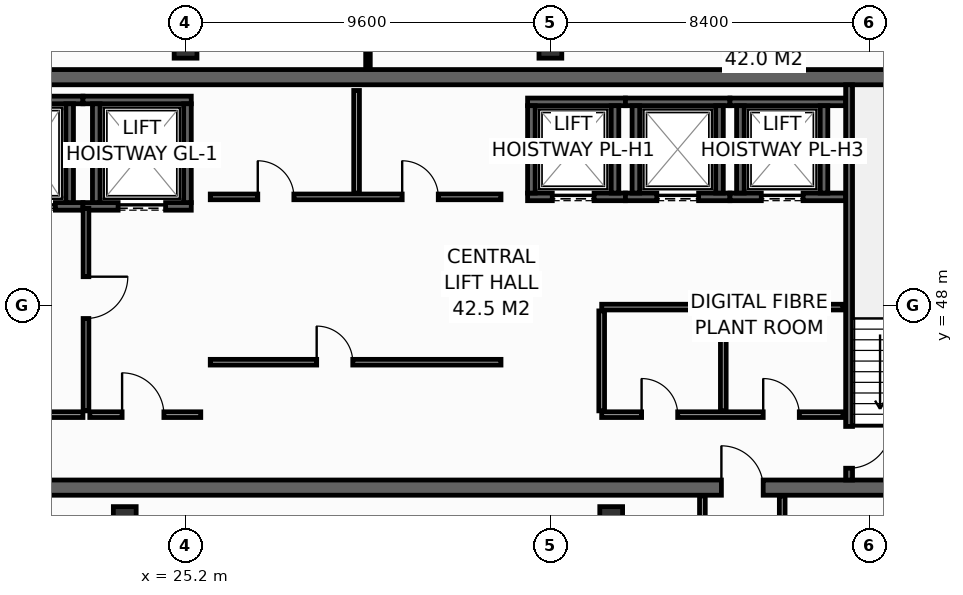
"""IFC4 building model, lengths in metres.
Left out: names, types, materials, properties, quantities, classifications, styles, units other than length and angle.
Written with IfcOpenShell. Run it as: python <this file> out.ifc"""

import sys

from ifc_helpers import new_model, si_unit, direction, frame, frame_2d, origin, origin_2d, place, context, subcontext, project, spatial, rectangle, hollow_rectangle, extrude, element, fill, save


model = new_model("IFC4")
c1 = context("Model", 3, precision=1e-05, world=origin(), true_north=direction((0.0, 1.0)))
c2 = subcontext(c1, "Body", "Model", "MODEL_VIEW")
j1 = project(units=[si_unit("LENGTHUNIT", "METRE"), si_unit("PLANEANGLEUNIT", "RADIAN")], contexts=[c1])
p1 = place(None, origin())
s1 = spatial("IfcSite", under=j1, at=p1, CompositionType="ELEMENT")
p2 = place(p1, origin())
s2 = spatial("IfcBuilding", under=s1, at=p2, CompositionType="ELEMENT")
p3 = place(p2, frame((0.0, 0.0, 287.6)))
s3 = spatial("IfcBuildingStorey", under=s2, at=p3, CompositionType="ELEMENT", Elevation=287.6)
p4 = place(p3, frame((13.7, 43.2, 0.0), z_axis=(0.0, 0.0, 1.0), x_axis=(1.0, 0.0, 0.0)))
e1 = element("IfcWall", 1, at=p4, inside=s3, PredefinedType="SHEAR", context=c2, shape_type="SweptSolid", body=[
    extrude(rectangle(XDim=32.5, YDim=0.4, at=frame_2d((16.25, 0.0))), origin(), (0.0, 0.0, 1.0), 3.55),
])
p5 = place(p4, frame((5.4, 0.0, 0.0)))
e2 = element("IfcOpeningElement", 2, at=p5, cuts=e1, PredefinedType="OPENING", context=c2, shape_type="SweptSolid", body=[
    extrude(rectangle(XDim=1.1, YDim=2.15, at=frame_2d((0.55, 1.075))), frame((0.0, 0.21, 0.0), z_axis=(0.0, -1.0, 0.0), x_axis=(1.0, 0.0, 0.0)), (0.0, 0.0, 1.0), 0.42),
])
p6 = place(p4, frame((25.6, 0.0, 0.0)))
e3 = element("IfcOpeningElement", 3, at=p6, cuts=e1, PredefinedType="OPENING", context=c2, shape_type="SweptSolid", body=[
    extrude(rectangle(XDim=1.1, YDim=2.15, at=frame_2d((0.55, 1.075))), frame((0.0, 0.21, 0.0), z_axis=(0.0, -1.0, 0.0), x_axis=(1.0, 0.0, 0.0)), (0.0, 0.0, 1.0), 0.42),
])
p7 = place(p3, frame((13.7, 54.0, 0.0), z_axis=(0.0, 0.0, 1.0), x_axis=(1.0, 0.0, 0.0)))
e4 = element("IfcWall", 4, at=p7, inside=s3, PredefinedType="SHEAR", context=c2, shape_type="SweptSolid", body=[
    extrude(rectangle(XDim=32.5, YDim=0.4, at=frame_2d((16.25, 0.0))), origin(), (0.0, 0.0, 1.0), 3.55),
])
for number, where, z_axis, x_axis in (
    (5, (25.2, 54.8, 0.0), (0.0, 0.0, 1.0), (1.0, 0.0, 0.0)),
    (6, (34.8, 54.8, 0.0), (0.0, 0.0, 1.0), (1.0, 0.0, 0.0)),
    (7, (23.6, 42.4, 0.0), (0.0, 0.0, 1.0), (1.0, 0.0, 0.0)),
    (8, (36.4, 42.4, 0.0), (0.0, 0.0, 1.0), (1.0, 0.0, 0.0)),
):
    element("IfcColumn", number, at=place(p3, frame(where, z_axis=z_axis, x_axis=x_axis)), inside=s3, PredefinedType="COLUMN", context=c2, shape_type="SweptSolid", body=[
        extrude(hollow_rectangle(XDim=0.6, YDim=0.6, WallThickness=0.028, at=origin_2d()), origin(), (0.0, 0.0, 1.0), 3.8),
    ])
p8 = place(p3, frame((19.85, 50.6, 0.0), z_axis=(0.0, 0.0, 1.0), x_axis=(1.0, 0.0, 0.0)))
e9 = element("IfcWall", 9, at=p8, inside=s3, PredefinedType="SHEAR", context=c2, shape_type="SweptSolid", body=[
    extrude(rectangle(XDim=2.65, YDim=0.2, at=frame_2d((1.325, 0.0))), origin(), (0.0, 0.0, 1.0), 3.55),
])
p9 = place(p8, frame((0.675, 0.0, 0.0)))
e10 = element("IfcOpeningElement", 10, at=p9, cuts=e9, PredefinedType="OPENING", context=c2, shape_type="SweptSolid", body=[
    extrude(rectangle(XDim=1.25, YDim=2.3, at=frame_2d((0.625, 1.15))), frame((0.0, 0.11, 0.0), z_axis=(0.0, -1.0, 0.0), x_axis=(1.0, 0.0, 0.0)), (0.0, 0.0, 1.0), 0.22),
])
p10 = place(p3, frame((19.85, 53.4, 0.0), z_axis=(0.0, 0.0, 1.0), x_axis=(1.0, 0.0, 0.0)))
e11 = element("IfcWall", 11, at=p10, inside=s3, PredefinedType="SHEAR", context=c2, shape_type="SweptSolid", body=[
    extrude(rectangle(XDim=2.65, YDim=0.2, at=frame_2d((1.325, 0.0))), origin(), (0.0, 0.0, 1.0), 3.55),
])
p11 = place(p3, frame((22.15, 50.7, 0.0), z_axis=(0.0, 0.0, 1.0), x_axis=(0.0, 1.0, 0.0)))
e12 = element("IfcWall", 12, at=p11, inside=s3, PredefinedType="SHEAR", context=c2, shape_type="SweptSolid", body=[
    extrude(rectangle(XDim=2.6, YDim=0.2, at=frame_2d((1.3, 0.0))), origin(), (0.0, 0.0, 1.0), 3.55),
])
p12 = place(p3, frame((22.5, 50.6, 0.0), z_axis=(0.0, 0.0, 1.0), x_axis=(1.0, 0.0, 0.0)))
e13 = element("IfcWall", 13, at=p12, inside=s3, PredefinedType="SHEAR", context=c2, shape_type="SweptSolid", body=[
    extrude(rectangle(XDim=2.85, YDim=0.2, at=frame_2d((1.425, 0.0))), origin(), (0.0, 0.0, 1.0), 3.55),
])
p13 = place(p12, frame((0.925, 0.0, 0.0)))
e14 = element("IfcOpeningElement", 14, at=p13, cuts=e13, PredefinedType="OPENING", context=c2, shape_type="SweptSolid", body=[
    extrude(rectangle(XDim=1.25, YDim=2.3, at=frame_2d((0.625, 1.15))), frame((0.0, 0.11, 0.0), z_axis=(0.0, -1.0, 0.0), x_axis=(1.0, 0.0, 0.0)), (0.0, 0.0, 1.0), 0.22),
])
p14 = place(p3, frame((22.5, 53.4, 0.0), z_axis=(0.0, 0.0, 1.0), x_axis=(1.0, 0.0, 0.0)))
e15 = element("IfcWall", 15, at=p14, inside=s3, PredefinedType="SHEAR", context=c2, shape_type="SweptSolid", body=[
    extrude(rectangle(XDim=2.85, YDim=0.2, at=frame_2d((1.425, 0.0))), origin(), (0.0, 0.0, 1.0), 3.55),
])
for number, where, z_axis, x_axis in (
    (16, (22.85, 50.7, 0.0), (0.0, 0.0, 1.0), (0.0, 1.0, 0.0)),
    (17, (25.25, 50.7, 0.0), (0.0, 0.0, 1.0), (0.0, 1.0, 0.0)),
):
    element("IfcWall", number, at=place(p3, frame(where, z_axis=z_axis, x_axis=x_axis)), inside=s3, PredefinedType="SHEAR", context=c2, shape_type="SweptSolid", body=[
        extrude(rectangle(XDim=2.6, YDim=0.2, at=frame_2d((1.3, 0.0))), origin(), (0.0, 0.0, 1.0), 3.55),
    ])
p15 = place(p3, frame((34.2, 50.85, 0.0), z_axis=(0.0, 0.0, 1.0), x_axis=(1.0, 0.0, 0.0)))
e18 = element("IfcWall", 18, at=p15, inside=s3, PredefinedType="SHEAR", context=c2, shape_type="SweptSolid", body=[
    extrude(rectangle(XDim=2.575, YDim=0.2, at=frame_2d((1.288, 0.0))), origin(), (0.0, 0.0, 1.0), 3.55),
])
p16 = place(p15, frame((0.65, 0.0, 0.0)))
e19 = element("IfcOpeningElement", 19, at=p16, cuts=e18, PredefinedType="OPENING", context=c2, shape_type="SweptSolid", body=[
    extrude(rectangle(XDim=1.1, YDim=2.2, at=frame_2d((0.55, 1.1))), frame((0.0, 0.11, 0.0), z_axis=(0.0, -1.0, 0.0), x_axis=(1.0, 0.0, 0.0)), (0.0, 0.0, 1.0), 0.22),
])
p17 = place(p3, frame((34.2, 53.35, 0.0), z_axis=(0.0, 0.0, 1.0), x_axis=(1.0, 0.0, 0.0)))
e20 = element("IfcWall", 20, at=p17, inside=s3, PredefinedType="SHEAR", context=c2, shape_type="SweptSolid", body=[
    extrude(rectangle(XDim=2.575, YDim=0.2, at=frame_2d((1.288, 0.0))), origin(), (0.0, 0.0, 1.0), 3.55),
])
for number, where, z_axis, x_axis in (
    (21, (34.3, 50.95, 0.0), (0.0, 0.0, 1.0), (0.0, 1.0, 0.0)),
    (22, (36.5, 50.95, 0.0), (0.0, 0.0, 1.0), (0.0, 1.0, 0.0)),
):
    element("IfcWall", number, at=place(p3, frame(where, z_axis=z_axis, x_axis=x_axis)), inside=s3, PredefinedType="SHEAR", context=c2, shape_type="SweptSolid", body=[
        extrude(rectangle(XDim=2.3, YDim=0.2, at=frame_2d((1.15, 0.0))), origin(), (0.0, 0.0, 1.0), 3.55),
    ])
p18 = place(p3, frame((36.775, 50.85, 0.0), z_axis=(0.0, 0.0, 1.0), x_axis=(1.0, 0.0, 0.0)))
e23 = element("IfcWall", 23, at=p18, inside=s3, PredefinedType="SHEAR", context=c2, shape_type="SweptSolid", body=[
    extrude(rectangle(XDim=2.75, YDim=0.2, at=frame_2d((1.375, 0.0))), origin(), (0.0, 0.0, 1.0), 3.55),
])
p19 = place(p18, frame((0.825, 0.0, 0.0)))
e24 = element("IfcOpeningElement", 24, at=p19, cuts=e23, PredefinedType="OPENING", context=c2, shape_type="SweptSolid", body=[
    extrude(rectangle(XDim=1.1, YDim=2.2, at=frame_2d((0.55, 1.1))), frame((0.0, 0.11, 0.0), z_axis=(0.0, -1.0, 0.0), x_axis=(1.0, 0.0, 0.0)), (0.0, 0.0, 1.0), 0.22),
])
p20 = place(p3, frame((36.775, 53.35, 0.0), z_axis=(0.0, 0.0, 1.0), x_axis=(1.0, 0.0, 0.0)))
e25 = element("IfcWall", 25, at=p20, inside=s3, PredefinedType="SHEAR", context=c2, shape_type="SweptSolid", body=[
    extrude(rectangle(XDim=2.75, YDim=0.2, at=frame_2d((1.375, 0.0))), origin(), (0.0, 0.0, 1.0), 3.55),
])
for number, where, z_axis, x_axis in (
    (26, (37.05, 50.95, 0.0), (0.0, 0.0, 1.0), (0.0, 1.0, 0.0)),
    (27, (39.25, 50.95, 0.0), (0.0, 0.0, 1.0), (0.0, 1.0, 0.0)),
):
    element("IfcWall", number, at=place(p3, frame(where, z_axis=z_axis, x_axis=x_axis)), inside=s3, PredefinedType="SHEAR", context=c2, shape_type="SweptSolid", body=[
        extrude(rectangle(XDim=2.3, YDim=0.2, at=frame_2d((1.15, 0.0))), origin(), (0.0, 0.0, 1.0), 3.55),
    ])
p21 = place(p3, frame((39.525, 50.85, 0.0), z_axis=(0.0, 0.0, 1.0), x_axis=(1.0, 0.0, 0.0)))
e28 = element("IfcWall", 28, at=p21, inside=s3, PredefinedType="SHEAR", context=c2, shape_type="SweptSolid", body=[
    extrude(rectangle(XDim=3.045, YDim=0.2, at=frame_2d((1.522, 0.0))), origin(), (0.0, 0.0, 1.0), 3.55),
])
p22 = place(p21, frame((0.825, 0.0, 0.0)))
e29 = element("IfcOpeningElement", 29, at=p22, cuts=e28, PredefinedType="OPENING", context=c2, shape_type="SweptSolid", body=[
    extrude(rectangle(XDim=1.1, YDim=2.2, at=frame_2d((0.55, 1.1))), frame((0.0, 0.11, 0.0), z_axis=(0.0, -1.0, 0.0), x_axis=(1.0, 0.0, 0.0)), (0.0, 0.0, 1.0), 0.22),
])
p23 = place(p3, frame((39.525, 53.35, 0.0), z_axis=(0.0, 0.0, 1.0), x_axis=(1.0, 0.0, 0.0)))
e30 = element("IfcWall", 30, at=p23, inside=s3, PredefinedType="SHEAR", context=c2, shape_type="SweptSolid", body=[
    extrude(rectangle(XDim=3.045, YDim=0.2, at=frame_2d((1.522, 0.0))), origin(), (0.0, 0.0, 1.0), 3.55),
])
for number, where, z_axis, x_axis in (
    (31, (39.8, 50.95, 0.0), (0.0, 0.0, 1.0), (0.0, 1.0, 0.0)),
    (32, (42.0, 50.95, 0.0), (0.0, 0.0, 1.0), (0.0, 1.0, 0.0)),
):
    element("IfcWall", number, at=place(p3, frame(where, z_axis=z_axis, x_axis=x_axis)), inside=s3, PredefinedType="SHEAR", context=c2, shape_type="SweptSolid", body=[
        extrude(rectangle(XDim=2.3, YDim=0.2, at=frame_2d((1.15, 0.0))), origin(), (0.0, 0.0, 1.0), 3.55),
    ])
p24 = place(p3, frame((42.66, 53.8, 0.0), z_axis=(0.0, 0.0, 1.0), x_axis=(0.0, -1.0, 0.0)))
e33 = element("IfcWall", 33, at=p24, inside=s3, PredefinedType="SHEAR", context=c2, shape_type="SweptSolid", body=[
    extrude(rectangle(XDim=10.4, YDim=0.18, at=frame_2d((5.2, 0.0))), origin(), (0.0, 0.0, 1.0), 3.55),
])
p25 = place(p24, frame((8.99, 0.0, 0.0)))
e34 = element("IfcOpeningElement", 34, at=p25, cuts=e33, PredefinedType="OPENING", context=c2, shape_type="SweptSolid", body=[
    extrude(rectangle(XDim=1.1, YDim=2.15, at=frame_2d((0.55, 1.075))), frame((0.0, 0.1, 0.0), z_axis=(0.0, -1.0, 0.0), x_axis=(1.0, 0.0, 0.0)), (0.0, 0.0, 1.0), 0.2),
])
p26 = place(p3, frame((17.36, 45.12, 0.0), z_axis=(0.0, 0.0, 1.0), x_axis=(1.0, 0.0, 0.0)))
e35 = element("IfcWall", 35, at=p26, inside=s3, PredefinedType="PARTITIONING", context=c2, shape_type="SweptSolid", body=[
    extrude(rectangle(XDim=5.14, YDim=0.15, at=frame_2d((2.57, 0.0))), origin(), (0.0, 0.0, 1.0), 3.55),
])
p27 = place(p26, frame((1.8, 0.0, 0.0)))
e36 = element("IfcOpeningElement", 36, at=p27, cuts=e35, PredefinedType="OPENING", context=c2, shape_type="SweptSolid", body=[
    extrude(rectangle(XDim=1.1, YDim=2.15, at=frame_2d((0.55, 1.075))), frame((0.0, 0.085, 0.0), z_axis=(0.0, -1.0, 0.0), x_axis=(1.0, 0.0, 0.0)), (0.0, 0.0, 1.0), 0.17),
])
p28 = place(p3, frame((22.58, 50.55, 0.0), z_axis=(0.0, 0.0, 1.0), x_axis=(0.0, -1.0, 0.0)))
e37 = element("IfcWall", 37, at=p28, inside=s3, PredefinedType="PARTITIONING", context=c2, shape_type="SweptSolid", body=[
    extrude(rectangle(XDim=5.33, YDim=0.15, at=frame_2d((2.665, 0.0))), origin(), (0.0, 0.0, 1.0), 3.55),
])
p29 = place(p28, frame((1.8, 0.0, 0.0)))
e38 = element("IfcOpeningElement", 38, at=p29, cuts=e37, PredefinedType="OPENING", context=c2, shape_type="SweptSolid", body=[
    extrude(rectangle(XDim=1.1, YDim=2.15, at=frame_2d((0.55, 1.075))), frame((0.0, 0.085, 0.0), z_axis=(0.0, -1.0, 0.0), x_axis=(1.0, 0.0, 0.0)), (0.0, 0.0, 1.0), 0.17),
])
p30 = place(p3, frame((22.68, 45.12, 0.0), z_axis=(0.0, 0.0, 1.0), x_axis=(1.0, 0.0, 0.0)))
e39 = element("IfcWall", 39, at=p30, inside=s3, PredefinedType="PARTITIONING", context=c2, shape_type="SweptSolid", body=[
    extrude(rectangle(XDim=2.92, YDim=0.15, at=frame_2d((1.46, 0.0))), origin(), (0.0, 0.0, 1.0), 3.55),
])
p31 = place(p30, frame((0.85, 0.0, 0.0)))
e40 = element("IfcOpeningElement", 40, at=p31, cuts=e39, PredefinedType="OPENING", context=c2, shape_type="SweptSolid", body=[
    extrude(rectangle(XDim=1.1, YDim=2.15, at=frame_2d((0.55, 1.075))), frame((0.0, 0.085, 0.0), z_axis=(0.0, -1.0, 0.0), x_axis=(1.0, 0.0, 0.0)), (0.0, 0.0, 1.0), 0.17),
])
p32 = place(p3, frame((36.15, 45.12, 0.0), z_axis=(0.0, 0.0, 1.0), x_axis=(1.0, 0.0, 0.0)))
e41 = element("IfcWall", 41, at=p32, inside=s3, PredefinedType="PARTITIONING", context=c2, shape_type="SweptSolid", body=[
    extrude(rectangle(XDim=6.35, YDim=0.15, at=frame_2d((3.175, 0.0))), origin(), (0.0, 0.0, 1.0), 3.55),
])
p33 = place(p32, frame((1.05, 0.0, 0.0)))
e42 = element("IfcOpeningElement", 42, at=p33, cuts=e41, PredefinedType="OPENING", context=c2, shape_type="SweptSolid", body=[
    extrude(rectangle(XDim=0.95, YDim=2.15, at=frame_2d((0.475, 1.075))), frame((0.0, 0.085, 0.0), z_axis=(0.0, -1.0, 0.0), x_axis=(1.0, 0.0, 0.0)), (0.0, 0.0, 1.0), 0.17),
])
p34 = place(p32, frame((4.25, 0.0, 0.0)))
e43 = element("IfcOpeningElement", 43, at=p34, cuts=e41, PredefinedType="OPENING", context=c2, shape_type="SweptSolid", body=[
    extrude(rectangle(XDim=0.95, YDim=2.15, at=frame_2d((0.475, 1.075))), frame((0.0, 0.085, 0.0), z_axis=(0.0, -1.0, 0.0), x_axis=(1.0, 0.0, 0.0)), (0.0, 0.0, 1.0), 0.17),
])
p35 = place(p3, frame((36.15, 47.95, 0.0), z_axis=(0.0, 0.0, 1.0), x_axis=(1.0, 0.0, 0.0)))
e44 = element("IfcWall", 44, at=p35, inside=s3, PredefinedType="PARTITIONING", context=c2, shape_type="SweptSolid", body=[
    extrude(rectangle(XDim=6.35, YDim=0.15, at=frame_2d((3.175, 0.0))), origin(), (0.0, 0.0, 1.0), 3.55),
])
for number, where, z_axis, x_axis in (
    (45, (36.15, 45.22, 0.0), (0.0, 0.0, 1.0), (0.0, 1.0, 0.0)),
    (46, (39.35, 45.22, 0.0), (0.0, 0.0, 1.0), (0.0, 1.0, 0.0)),
):
    element("IfcWall", number, at=place(p3, frame(where, z_axis=z_axis, x_axis=x_axis)), inside=s3, PredefinedType="PARTITIONING", context=c2, shape_type="SweptSolid", body=[
        extrude(rectangle(XDim=2.63, YDim=0.15, at=frame_2d((1.315, 0.0))), origin(), (0.0, 0.0, 1.0), 3.55),
    ])
p36 = place(p3, frame((25.85, 50.85, 0.0), z_axis=(0.0, 0.0, 1.0), x_axis=(1.0, 0.0, 0.0)))
e47 = element("IfcWall", 47, at=p36, inside=s3, PredefinedType="PARTITIONING", context=c2, shape_type="SweptSolid", body=[
    extrude(rectangle(XDim=7.65, YDim=0.15, at=frame_2d((3.825, 0.0))), origin(), (0.0, 0.0, 1.0), 3.55),
])
p37 = place(p36, frame((1.25, 0.0, 0.0)))
e48 = element("IfcOpeningElement", 48, at=p37, cuts=e47, PredefinedType="OPENING", context=c2, shape_type="SweptSolid", body=[
    extrude(rectangle(XDim=0.95, YDim=2.15, at=frame_2d((0.475, 1.075))), frame((0.0, 0.085, 0.0), z_axis=(0.0, -1.0, 0.0), x_axis=(1.0, 0.0, 0.0)), (0.0, 0.0, 1.0), 0.17),
])
p38 = place(p36, frame((5.05, 0.0, 0.0)))
e49 = element("IfcOpeningElement", 49, at=p38, cuts=e47, PredefinedType="OPENING", context=c2, shape_type="SweptSolid", body=[
    extrude(rectangle(XDim=0.95, YDim=2.15, at=frame_2d((0.475, 1.075))), frame((0.0, 0.085, 0.0), z_axis=(0.0, -1.0, 0.0), x_axis=(1.0, 0.0, 0.0)), (0.0, 0.0, 1.0), 0.17),
])
p39 = place(p3, frame((29.7, 50.95, 0.0), z_axis=(0.0, 0.0, 1.0), x_axis=(0.0, 1.0, 0.0)))
e50 = element("IfcWall", 50, at=p39, inside=s3, PredefinedType="PARTITIONING", context=c2, shape_type="SweptSolid", body=[
    extrude(rectangle(XDim=2.7, YDim=0.15, at=frame_2d((1.35, 0.0))), origin(), (0.0, 0.0, 1.0), 3.55),
])
p40 = place(p3, frame((25.85, 46.5, 0.0), z_axis=(0.0, 0.0, 1.0), x_axis=(1.0, 0.0, 0.0)))
e51 = element("IfcWall", 51, at=p40, inside=s3, PredefinedType="PARTITIONING", context=c2, shape_type="SweptSolid", body=[
    extrude(rectangle(XDim=7.65, YDim=0.15, at=frame_2d((3.825, 0.0))), origin(), (0.0, 0.0, 1.0), 3.55),
])
p41 = place(p40, frame((2.8, 0.0, 0.0)))
e52 = element("IfcOpeningElement", 52, at=p41, cuts=e51, PredefinedType="OPENING", context=c2, shape_type="SweptSolid", body=[
    extrude(rectangle(XDim=0.95, YDim=2.15, at=frame_2d((0.475, 1.075))), frame((0.0, 0.085, 0.0), z_axis=(0.0, -1.0, 0.0), x_axis=(1.0, 0.0, 0.0)), (0.0, 0.0, 1.0), 0.17),
])
p42 = place(p3, frame((30.0, 54.22, 0.0), z_axis=(0.0, 0.0, 1.0), x_axis=(0.0, 1.0, 0.0)))
e53 = element("IfcWall", 53, at=p42, inside=s3, PredefinedType="PARTITIONING", context=c2, shape_type="SweptSolid", body=[
    extrude(rectangle(XDim=1.775, YDim=0.12, at=frame_2d((0.888, 0.0))), origin(), (0.0, 0.0, 1.0), 2.935),
])
for number, where, z_axis, x_axis in (
    (54, (38.8, 41.15, 0.0), (0.0, 0.0, 1.0), (0.0, 1.0, 0.0)),
    (55, (40.9, 41.15, 0.0), (0.0, 0.0, 1.0), (0.0, 1.0, 0.0)),
):
    element("IfcWall", number, at=place(p3, frame(where, z_axis=z_axis, x_axis=x_axis)), inside=s3, PredefinedType="PARTITIONING", context=c2, shape_type="SweptSolid", body=[
        extrude(rectangle(XDim=1.83, YDim=0.15, at=frame_2d((0.915, 0.0))), origin(), (0.0, 0.0, 1.0), 3.55),
    ])
p43 = place(p9, origin())
e56 = element("IfcDoor", 56, at=p43, inside=s3, OperationType="SLIDING_TO_LEFT", PredefinedType="DOOR", context=c2, shape_type="SweptSolid", body=[
    extrude(rectangle(XDim=1.25, YDim=2.3, at=frame_2d((0.625, 1.15))), frame((0.0, 0.025, 0.0), z_axis=(0.0, -1.0, 0.0), x_axis=(1.0, 0.0, 0.0)), (0.0, 0.0, 1.0), 0.05),
])
fill(e10, e56)
p44 = place(p13, origin())
e57 = element("IfcDoor", 57, at=p44, inside=s3, OperationType="SLIDING_TO_LEFT", PredefinedType="DOOR", context=c2, shape_type="SweptSolid", body=[
    extrude(rectangle(XDim=1.25, YDim=2.3, at=frame_2d((0.625, 1.15))), frame((0.0, 0.025, 0.0), z_axis=(0.0, -1.0, 0.0), x_axis=(1.0, 0.0, 0.0)), (0.0, 0.0, 1.0), 0.05),
])
fill(e14, e57)
p45 = place(p16, origin())
e58 = element("IfcDoor", 58, at=p45, inside=s3, OperationType="SLIDING_TO_LEFT", PredefinedType="DOOR", context=c2, shape_type="SweptSolid", body=[
    extrude(rectangle(XDim=1.1, YDim=2.2, at=frame_2d((0.55, 1.1))), frame((0.0, 0.025, 0.0), z_axis=(0.0, -1.0, 0.0), x_axis=(1.0, 0.0, 0.0)), (0.0, 0.0, 1.0), 0.05),
])
fill(e19, e58)
p46 = place(p19, origin())
e59 = element("IfcDoor", 59, at=p46, inside=s3, OperationType="SLIDING_TO_LEFT", PredefinedType="DOOR", context=c2, shape_type="SweptSolid", body=[
    extrude(rectangle(XDim=1.1, YDim=2.2, at=frame_2d((0.55, 1.1))), frame((0.0, 0.025, 0.0), z_axis=(0.0, -1.0, 0.0), x_axis=(1.0, 0.0, 0.0)), (0.0, 0.0, 1.0), 0.05),
])
fill(e24, e59)
p47 = place(p22, origin())
e60 = element("IfcDoor", 60, at=p47, inside=s3, OperationType="SLIDING_TO_LEFT", PredefinedType="DOOR", context=c2, shape_type="SweptSolid", body=[
    extrude(rectangle(XDim=1.1, YDim=2.2, at=frame_2d((0.55, 1.1))), frame((0.0, 0.025, 0.0), z_axis=(0.0, -1.0, 0.0), x_axis=(1.0, 0.0, 0.0)), (0.0, 0.0, 1.0), 0.05),
])
fill(e29, e60)
p48 = place(p25, origin())
e61 = element("IfcDoor", 61, at=p48, inside=s3, OperationType="SINGLE_SWING_LEFT", PredefinedType="DOOR", context=c2, shape_type="SweptSolid", body=[
    extrude(rectangle(XDim=1.1, YDim=2.15, at=frame_2d((0.55, 1.075))), frame((0.0, 0.025, 0.0), z_axis=(0.0, -1.0, 0.0), x_axis=(1.0, 0.0, 0.0)), (0.0, 0.0, 1.0), 0.05),
])
fill(e34, e61)
p49 = place(p29, origin())
e62 = element("IfcDoor", 62, at=p49, inside=s3, OperationType="SINGLE_SWING_LEFT", PredefinedType="DOOR", context=c2, shape_type="SweptSolid", body=[
    extrude(rectangle(XDim=1.1, YDim=2.15, at=frame_2d((0.55, 1.075))), frame((0.0, 0.025, 0.0), z_axis=(0.0, -1.0, 0.0), x_axis=(1.0, 0.0, 0.0)), (0.0, 0.0, 1.0), 0.05),
])
fill(e38, e62)
p50 = place(p31, origin())
e63 = element("IfcDoor", 63, at=p50, inside=s3, OperationType="SINGLE_SWING_LEFT", PredefinedType="DOOR", context=c2, shape_type="SweptSolid", body=[
    extrude(rectangle(XDim=1.1, YDim=2.15, at=frame_2d((0.55, 1.075))), frame((0.0, 0.025, 0.0), z_axis=(0.0, -1.0, 0.0), x_axis=(1.0, 0.0, 0.0)), (0.0, 0.0, 1.0), 0.05),
])
fill(e40, e63)
p51 = place(p6, origin())
e64 = element("IfcDoor", 64, at=p51, inside=s3, OperationType="SINGLE_SWING_LEFT", PredefinedType="DOOR", context=c2, shape_type="SweptSolid", body=[
    extrude(rectangle(XDim=1.1, YDim=2.15, at=frame_2d((0.55, 1.075))), frame((0.0, 0.025, 0.0), z_axis=(0.0, -1.0, 0.0), x_axis=(1.0, 0.0, 0.0)), (0.0, 0.0, 1.0), 0.05),
])
fill(e3, e64)
p52 = place(p33, origin())
e65 = element("IfcDoor", 65, at=p52, inside=s3, OperationType="SINGLE_SWING_LEFT", PredefinedType="DOOR", context=c2, shape_type="SweptSolid", body=[
    extrude(rectangle(XDim=0.95, YDim=2.15, at=frame_2d((0.475, 1.075))), frame((0.0, 0.025, 0.0), z_axis=(0.0, -1.0, 0.0), x_axis=(1.0, 0.0, 0.0)), (0.0, 0.0, 1.0), 0.05),
])
fill(e42, e65)
p53 = place(p34, origin())
e66 = element("IfcDoor", 66, at=p53, inside=s3, OperationType="SINGLE_SWING_LEFT", PredefinedType="DOOR", context=c2, shape_type="SweptSolid", body=[
    extrude(rectangle(XDim=0.95, YDim=2.15, at=frame_2d((0.475, 1.075))), frame((0.0, 0.025, 0.0), z_axis=(0.0, -1.0, 0.0), x_axis=(1.0, 0.0, 0.0)), (0.0, 0.0, 1.0), 0.05),
])
fill(e43, e66)
p54 = place(p37, origin())
e67 = element("IfcDoor", 67, at=p54, inside=s3, OperationType="SINGLE_SWING_LEFT", PredefinedType="DOOR", context=c2, shape_type="SweptSolid", body=[
    extrude(rectangle(XDim=0.95, YDim=2.15, at=frame_2d((0.475, 1.075))), frame((0.0, 0.025, 0.0), z_axis=(0.0, -1.0, 0.0), x_axis=(1.0, 0.0, 0.0)), (0.0, 0.0, 1.0), 0.05),
])
fill(e48, e67)
p55 = place(p38, origin())
e68 = element("IfcDoor", 68, at=p55, inside=s3, OperationType="SINGLE_SWING_LEFT", PredefinedType="DOOR", context=c2, shape_type="SweptSolid", body=[
    extrude(rectangle(XDim=0.95, YDim=2.15, at=frame_2d((0.475, 1.075))), frame((0.0, 0.025, 0.0), z_axis=(0.0, -1.0, 0.0), x_axis=(1.0, 0.0, 0.0)), (0.0, 0.0, 1.0), 0.05),
])
fill(e49, e68)
p56 = place(p41, origin())
e69 = element("IfcDoor", 69, at=p56, inside=s3, OperationType="SINGLE_SWING_LEFT", PredefinedType="DOOR", context=c2, shape_type="SweptSolid", body=[
    extrude(rectangle(XDim=0.95, YDim=2.15, at=frame_2d((0.475, 1.075))), frame((0.0, 0.025, 0.0), z_axis=(0.0, -1.0, 0.0), x_axis=(1.0, 0.0, 0.0)), (0.0, 0.0, 1.0), 0.05),
])
fill(e52, e69)
save(model, sys.argv[1])
